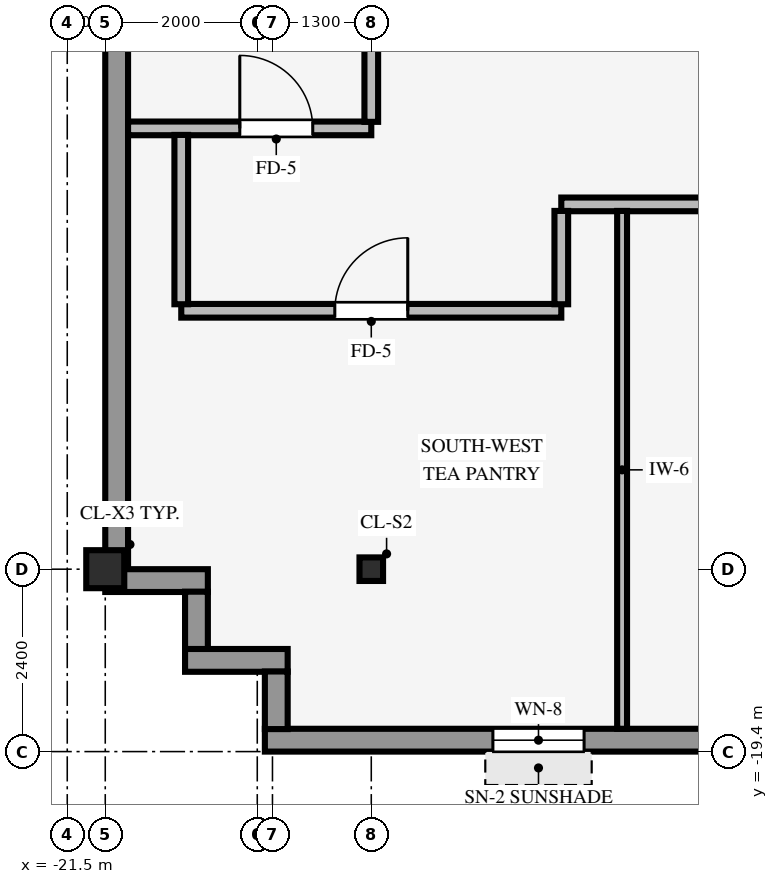
"""IFC4 building model, lengths in metres.
Left out: names, types, materials, properties, quantities, classifications, styles, units other than length and angle.
Written with IfcOpenShell. Run it as: python <this file> out.ifc"""

import sys

from ifc_helpers import new_model, si_unit, direction, frame, frame_2d, origin, origin_2d, place, context, subcontext, project, spatial, rectangle, hollow_rectangle, i_section, extrude, source, transform, mapped, element, fill, save


model = new_model("IFC4")
c1 = context("Model", 3, precision=1e-05, world=origin(), true_north=direction((0.0, 1.0)))
c2 = subcontext(c1, "Body", "Model", "MODEL_VIEW")
j1 = project(units=[si_unit("LENGTHUNIT", "METRE"), si_unit("PLANEANGLEUNIT", "RADIAN")], contexts=[c1])
p1 = place(None, origin())
s1 = spatial("IfcSite", under=j1, at=p1, CompositionType="ELEMENT")
p2 = place(p1, origin())
s2 = spatial("IfcBuilding", under=s1, at=p2, CompositionType="ELEMENT")
p3 = place(p2, frame((0.0, 0.0, 249.3)))
s3 = spatial("IfcBuildingStorey", under=s2, at=p3, CompositionType="ELEMENT", Elevation=249.3)
p4 = place(p3, frame((-21.0, -17.0, 0.0), z_axis=(0.0, 0.0, 1.0), x_axis=(1.0, 0.0, 0.0)))
e1 = element("IfcColumn", 1, at=p4, inside=s3, PredefinedType="COLUMN", context=c2, shape_type="SweptSolid", body=[
    extrude(hollow_rectangle(XDim=0.5, YDim=0.5, WallThickness=0.032, InnerFilletRadius=0.032, OuterFilletRadius=0.064, at=origin_2d()), origin(), (0.0, 0.0, 1.0), 3.25),
])
p5 = place(p3, frame((-17.5, -17.0, 0.0), z_axis=(0.0, 0.0, 1.0), x_axis=(1.0, 0.0, 0.0)))
e2 = element("IfcColumn", 2, at=p5, inside=s3, PredefinedType="COLUMN", context=c2, shape_type="SweptSolid", body=[
    extrude(i_section(OverallWidth=0.31, OverallDepth=0.31, WebThickness=0.015, FlangeThickness=0.015, FilletRadius=0.015, at=origin_2d()), origin(), (0.0, 0.0, 1.0), 3.25),
])
p6 = place(p3, frame((-18.9, -19.25, 0.0), z_axis=(0.0, 0.0, 1.0), x_axis=(1.0, 0.0, 0.0)))
e3 = element("IfcWall", 3, at=p6, inside=s3, PredefinedType="STANDARD", context=c2, shape_type="SweptSolid", body=[
    extrude(rectangle(XDim=14.2, YDim=0.3, at=frame_2d((7.1, 0.0))), origin(), (0.0, 0.0, 1.0), 2.585),
])
p7 = place(p6, frame((3.0, 0.0, 0.8)))
e4 = element("IfcOpeningElement", 4, at=p7, cuts=e3, PredefinedType="OPENING", context=c2, shape_type="SweptSolid", body=[
    extrude(rectangle(XDim=1.2, YDim=1.48, at=frame_2d((0.6, 0.74))), frame((0.0, 0.16, 0.0), z_axis=(0.0, -1.0, 0.0), x_axis=(1.0, 0.0, 0.0)), (0.0, 0.0, 1.0), 0.32),
])
p8 = place(p3, frame((-20.85, -17.004, 0.0), z_axis=(0.0, 0.0, 1.0), x_axis=(0.0, 1.0, 0.0)))
e5 = element("IfcWall", 5, at=p8, inside=s3, PredefinedType="STANDARD", context=c2, shape_type="SweptSolid", body=[
    extrude(rectangle(XDim=13.404, YDim=0.3, at=frame_2d((6.702, 0.0))), origin(), (0.0, 0.0, 1.0), 2.585),
])
p9 = place(p8, frame((8.578, 0.0, 0.8)))
e6 = element("IfcOpeningElement", 6, at=p9, cuts=e5, PredefinedType="OPENING", context=c2, shape_type="SweptSolid", body=[
    extrude(rectangle(XDim=1.95, YDim=1.48, at=frame_2d((0.975, 0.74))), frame((0.0, 0.16, 0.0), z_axis=(0.0, -1.0, 0.0), x_axis=(1.0, 0.0, 0.0)), (0.0, 0.0, 1.0), 0.32),
])
p10 = place(p3, frame((-21.0, -17.15, 0.0), z_axis=(0.0, 0.0, 1.0), x_axis=(1.0, 0.0, 0.0)))
e7 = element("IfcWall", 7, at=p10, inside=s3, PredefinedType="STANDARD", context=c2, shape_type="SweptSolid", body=[
    extrude(rectangle(XDim=1.35, YDim=0.3, at=frame_2d((0.675, 0.0))), origin(), (0.0, 0.0, 1.0), 2.335),
])
p11 = place(p3, frame((-19.8, -18.054, 0.0), z_axis=(0.0, 0.0, 1.0), x_axis=(0.0, 1.0, 0.0)))
e8 = element("IfcWall", 8, at=p11, inside=s3, PredefinedType="STANDARD", context=c2, shape_type="SweptSolid", body=[
    extrude(rectangle(XDim=0.758, YDim=0.3, at=frame_2d((0.379, 0.0))), origin(), (0.0, 0.0, 1.0), 2.335),
])
p12 = place(p3, frame((-19.95, -18.2, 0.0), z_axis=(0.0, 0.0, 1.0), x_axis=(1.0, 0.0, 0.0)))
e9 = element("IfcWall", 9, at=p12, inside=s3, PredefinedType="STANDARD", context=c2, shape_type="SweptSolid", body=[
    extrude(rectangle(XDim=1.35, YDim=0.3, at=frame_2d((0.675, 0.0))), origin(), (0.0, 0.0, 1.0), 2.335),
])
p13 = place(p3, frame((-18.75, -19.104, 0.0), z_axis=(0.0, 0.0, 1.0), x_axis=(0.0, 1.0, 0.0)))
e10 = element("IfcWall", 10, at=p13, inside=s3, PredefinedType="STANDARD", context=c2, shape_type="SweptSolid", body=[
    extrude(rectangle(XDim=0.758, YDim=0.3, at=frame_2d((0.379, 0.0))), origin(), (0.0, 0.0, 1.0), 2.335),
])
p14 = place(p3, frame((-20.0, -13.6, 0.0), z_axis=(0.0, 0.0, 1.0), x_axis=(1.0, 0.0, 0.0)))
e11 = element("IfcWall", 11, at=p14, inside=s3, PredefinedType="PARTITIONING", context=c2, shape_type="SweptSolid", body=[
    extrude(rectangle(XDim=5.0, YDim=0.18, at=frame_2d((2.5, 0.0))), origin(), (0.0, 0.0, 1.0), 2.929),
])
p15 = place(p14, frame((2.02, 0.0, 0.0)))
e12 = element("IfcOpeningElement", 12, at=p15, cuts=e11, PredefinedType="OPENING", context=c2, shape_type="SweptSolid", body=[
    extrude(rectangle(XDim=0.96, YDim=2.1, at=frame_2d((0.48, 1.05))), frame((0.0, 0.1, 0.0), z_axis=(0.0, -1.0, 0.0), x_axis=(1.0, 0.0, 0.0)), (0.0, 0.0, 1.0), 0.2),
])
p16 = place(p3, frame((-15.0, -12.2, 0.0), z_axis=(0.0, 0.0, 1.0), x_axis=(1.0, 0.0, 0.0)))
e13 = element("IfcWall", 13, at=p16, inside=s3, PredefinedType="PARTITIONING", context=c2, shape_type="SweptSolid", body=[
    extrude(rectangle(XDim=6.0, YDim=0.18, at=frame_2d((3.0, 0.0))), origin(), (0.0, 0.0, 1.0), 3.24),
])
p17 = place(p16, frame((2.92, 0.0, 0.0)))
e14 = element("IfcOpeningElement", 14, at=p17, cuts=e13, PredefinedType="OPENING", context=c2, shape_type="SweptSolid", body=[
    extrude(rectangle(XDim=0.96, YDim=2.1, at=frame_2d((0.48, 1.05))), frame((0.0, 0.1, 0.0), z_axis=(0.0, -1.0, 0.0), x_axis=(1.0, 0.0, 0.0)), (0.0, 0.0, 1.0), 0.2),
])
p18 = place(p3, frame((-20.7, -11.2, 0.0), z_axis=(0.0, 0.0, 1.0), x_axis=(1.0, 0.0, 0.0)))
e15 = element("IfcWall", 15, at=p18, inside=s3, PredefinedType="PARTITIONING", context=c2, shape_type="SweptSolid", body=[
    extrude(rectangle(XDim=3.2, YDim=0.18, at=frame_2d((1.6, 0.0))), origin(), (0.0, 0.0, 1.0), 3.24),
])
p19 = place(p18, frame((1.47, 0.0, 0.0)))
e16 = element("IfcOpeningElement", 16, at=p19, cuts=e15, PredefinedType="OPENING", context=c2, shape_type="SweptSolid", body=[
    extrude(rectangle(XDim=0.96, YDim=2.1, at=frame_2d((0.48, 1.05))), frame((0.0, 0.1, 0.0), z_axis=(0.0, -1.0, 0.0), x_axis=(1.0, 0.0, 0.0)), (0.0, 0.0, 1.0), 0.2),
])
p20 = place(p3, frame((-20.0, -13.514, 0.0), z_axis=(0.0, 0.0, 1.0), x_axis=(0.0, 1.0, 0.0)))
e17 = element("IfcWall", 17, at=p20, inside=s3, PredefinedType="PARTITIONING", context=c2, shape_type="SweptSolid", body=[
    extrude(rectangle(XDim=2.228, YDim=0.18, at=frame_2d((1.114, 0.0))), origin(), (0.0, 0.0, 1.0), 3.24),
])
p21 = place(p3, frame((-17.5, -11.114, 0.0), z_axis=(0.0, 0.0, 1.0), x_axis=(0.0, 1.0, 0.0)))
e18 = element("IfcWall", 18, at=p21, inside=s3, PredefinedType="PARTITIONING", context=c2, shape_type="SweptSolid", body=[
    extrude(rectangle(XDim=1.118, YDim=0.18, at=frame_2d((0.559, 0.0))), origin(), (0.0, 0.0, 1.0), 2.335),
])
p22 = place(p3, frame((-15.0, -13.514, 0.0), z_axis=(0.0, 0.0, 1.0), x_axis=(0.0, 1.0, 0.0)))
e19 = element("IfcWall", 19, at=p22, inside=s3, PredefinedType="PARTITIONING", context=c2, shape_type="SweptSolid", body=[
    extrude(rectangle(XDim=1.228, YDim=0.18, at=frame_2d((0.614, 0.0))), origin(), (0.0, 0.0, 1.0), 3.24),
])
p23 = place(p3, frame((-14.2, -19.1, 0.0), z_axis=(0.0, 0.0, 1.0), x_axis=(0.0, 1.0, 0.0)))
e20 = element("IfcWall", 20, at=p23, inside=s3, PredefinedType="PARTITIONING", context=c2, shape_type="SweptSolid", body=[
    extrude(rectangle(XDim=6.814, YDim=0.13, at=frame_2d((3.407, 0.0))), origin(), (0.0, 0.0, 1.0), 3.24),
])
m1 = source(origin(), c2, "Body", "SweptSolid", [
    extrude(rectangle(XDim=1.2, YDim=1.48, at=frame_2d((0.6, 0.74))), frame((0.0, 0.03, 0.0), z_axis=(0.0, -1.0, 0.0), x_axis=(1.0, 0.0, 0.0)), (0.0, 0.0, 1.0), 0.06),
])
p24 = place(p7, origin())
e21 = element("IfcWindow", 21, at=p24, inside=s3, PartitioningType="SINGLE_PANEL", PredefinedType="WINDOW", context=c2, shape_type="MappedRepresentation", body=[
    mapped(m1, transform((0.0, 0.0, 0.0), scale=1.0)),
])
fill(e4, e21)
m2 = source(origin(), c2, "Body", "SweptSolid", [
    extrude(rectangle(XDim=0.96, YDim=2.1, at=frame_2d((0.48, 1.05))), frame((0.0, 0.025, 0.0), z_axis=(0.0, -1.0, 0.0), x_axis=(1.0, 0.0, 0.0)), (0.0, 0.0, 1.0), 0.05),
])
p25 = place(p15, origin())
e22 = element("IfcDoor", 22, at=p25, inside=s3, OperationType="SINGLE_SWING_RIGHT", PredefinedType="DOOR", context=c2, shape_type="MappedRepresentation", body=[
    mapped(m2, transform((0.0, 0.0, 0.0), scale=1.0)),
])
fill(e12, e22)
p26 = place(p19, origin())
e23 = element("IfcDoor", 23, at=p26, inside=s3, OperationType="SINGLE_SWING_LEFT", PredefinedType="DOOR", context=c2, shape_type="MappedRepresentation", body=[
    mapped(m2, transform((0.0, 0.0, 0.0), scale=1.0)),
])
fill(e16, e23)
save(model, sys.argv[1])
